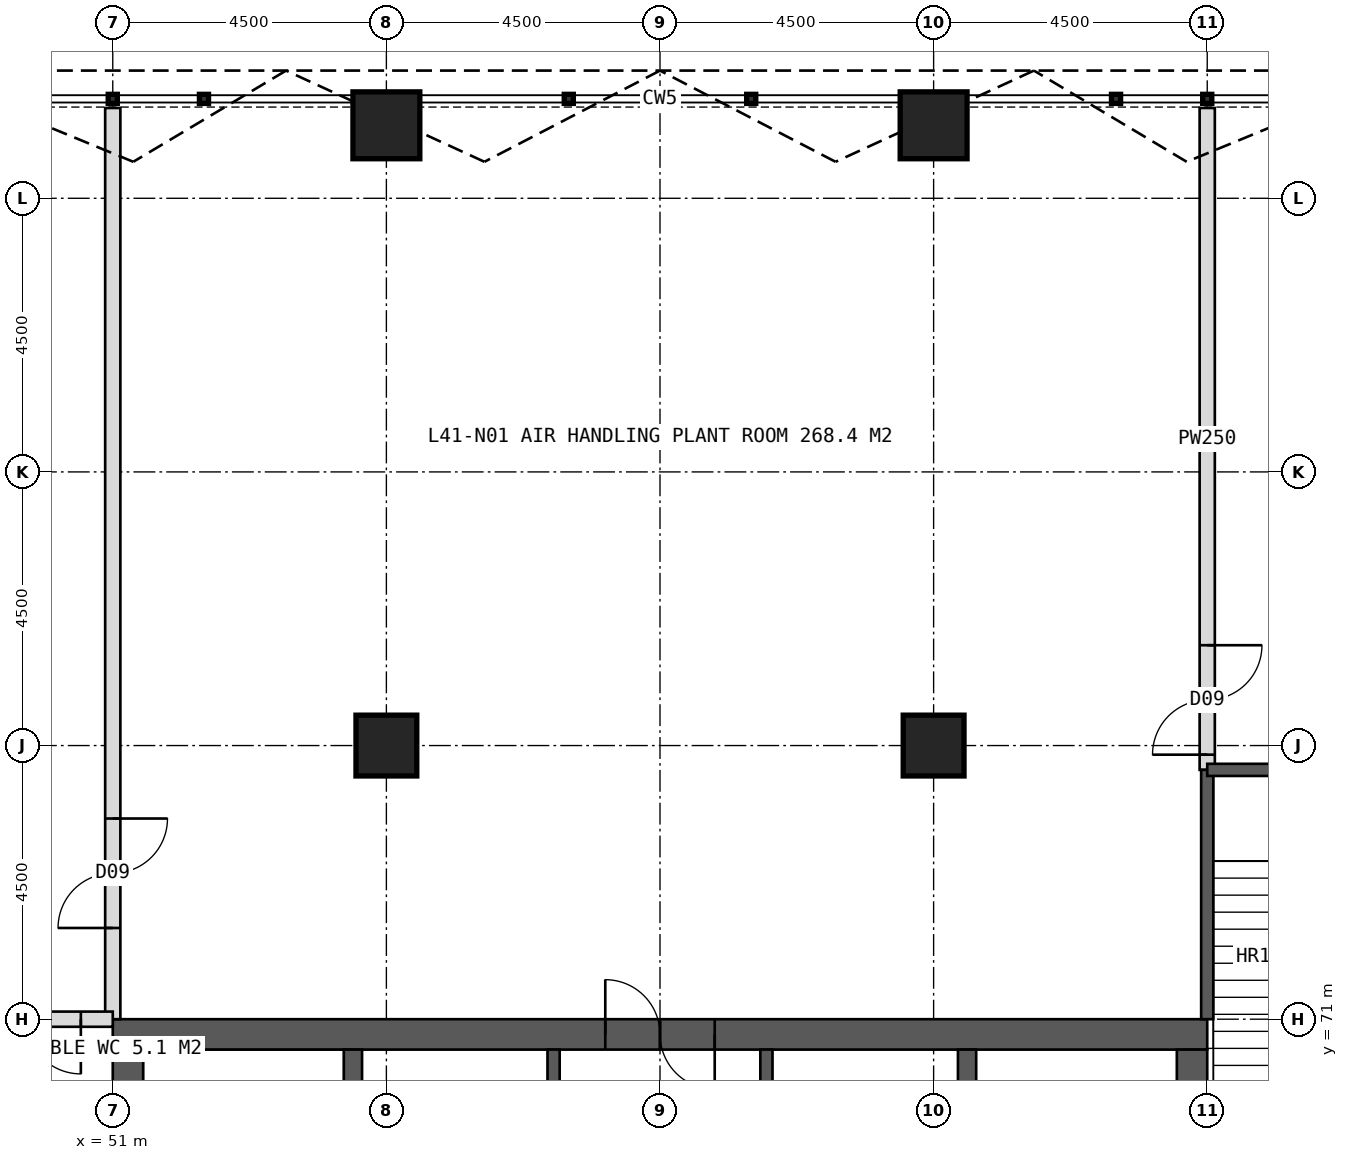
"""IFC4 building model, lengths in metres.
Left out: names, types, materials, properties, quantities, classifications, styles, units other than length and angle.
Written with IfcOpenShell. Run it as: python <this file> out.ifc"""

import sys

from ifc_helpers import new_model, si_unit, direction, frame, frame_2d, origin, origin_2d, place, context, subcontext, project, spatial, rectangle, hollow_rectangle, extrude, element, fill, save


model = new_model("IFC4")
c1 = context("Model", 3, precision=1e-05, world=origin(), true_north=direction((0.0, 1.0)))
c2 = subcontext(c1, "Body", "Model", "MODEL_VIEW")
j1 = project(units=[si_unit("LENGTHUNIT", "METRE"), si_unit("PLANEANGLEUNIT", "RADIAN")], contexts=[c1])
p1 = place(None, origin())
s1 = spatial("IfcSite", under=j1, at=p1, CompositionType="ELEMENT")
p2 = place(p1, origin())
s2 = spatial("IfcBuilding", under=s1, at=p2, CompositionType="ELEMENT")
p3 = place(p2, frame((0.0, 0.0, 172.0)))
s3 = spatial("IfcBuildingStorey", under=s2, at=p3, CompositionType="ELEMENT", Elevation=172.0)
p4 = place(p3, frame((51.0, 70.75, 0.0), z_axis=(0.0, 0.0, 1.0), x_axis=(1.0, 0.0, 0.0)))
e1 = element("IfcWall", 1, at=p4, inside=s3, PredefinedType="SHEAR", context=c2, shape_type="SweptSolid", body=[
    extrude(rectangle(XDim=18.0, YDim=0.5, at=frame_2d((9.0, 0.0))), origin(), (0.0, 0.0, 1.0), 5.0),
])
p5 = place(p4, frame((8.1, 0.0, 0.0)))
e2 = element("IfcOpeningElement", 2, at=p5, cuts=e1, PredefinedType="OPENING", context=c2, shape_type="SweptSolid", body=[
    extrude(rectangle(XDim=1.8, YDim=2.2, at=frame_2d((0.9, 1.1))), frame((0.0, 0.26, 0.0), z_axis=(0.0, -1.0, 0.0), x_axis=(1.0, 0.0, 0.0)), (0.0, 0.0, 1.0), 0.52),
])
p6 = place(p3, frame((51.25, 53.5, 0.0), z_axis=(0.0, 0.0, 1.0), x_axis=(0.0, 1.0, 0.0)))
e3 = element("IfcWall", 3, at=p6, inside=s3, PredefinedType="SHEAR", context=c2, shape_type="SweptSolid", body=[
    extrude(rectangle(XDim=17.0, YDim=0.5, at=frame_2d((8.5, 0.0))), origin(), (0.0, 0.0, 1.0), 5.0),
])
p7 = place(p6, frame((6.0, 0.0, 0.0)))
e4 = element("IfcOpeningElement", 4, at=p7, cuts=e3, PredefinedType="OPENING", context=c2, shape_type="SweptSolid", body=[
    extrude(rectangle(XDim=1.5, YDim=2.2, at=frame_2d((0.75, 1.1))), frame((0.0, 0.26, 0.0), z_axis=(0.0, -1.0, 0.0), x_axis=(1.0, 0.0, 0.0)), (0.0, 0.0, 1.0), 0.52),
])
p8 = place(p3, frame((68.75, 53.5, 0.0), z_axis=(0.0, 0.0, 1.0), x_axis=(0.0, 1.0, 0.0)))
e5 = element("IfcWall", 5, at=p8, inside=s3, PredefinedType="SHEAR", context=c2, shape_type="SweptSolid", body=[
    extrude(rectangle(XDim=17.0, YDim=0.5, at=frame_2d((8.5, 0.0))), origin(), (0.0, 0.0, 1.0), 5.0),
])
p9 = place(p8, frame((9.5, 0.0, 0.0)))
e6 = element("IfcOpeningElement", 6, at=p9, cuts=e5, PredefinedType="OPENING", context=c2, shape_type="SweptSolid", body=[
    extrude(rectangle(XDim=1.5, YDim=2.2, at=frame_2d((0.75, 1.1))), frame((0.0, 0.26, 0.0), z_axis=(0.0, -1.0, 0.0), x_axis=(1.0, 0.0, 0.0)), (0.0, 0.0, 1.0), 0.52),
])
for number, where, z_axis, x_axis in (
    (7, (54.95, 53.5, 0.0), (0.0, 0.0, 1.0), (0.0, 1.0, 0.0)),
    (8, (65.05, 53.5, 0.0), (0.0, 0.0, 1.0), (0.0, 1.0, 0.0)),
):
    element("IfcWall", number, at=place(p3, frame(where, z_axis=z_axis, x_axis=x_axis)), inside=s3, PredefinedType="SHEAR", context=c2, shape_type="SweptSolid", body=[
        extrude(rectangle(XDim=17.0, YDim=0.3, at=frame_2d((8.5, 0.0))), origin(), (0.0, 0.0, 1.0), 5.0),
    ])
for number, where, z_axis, x_axis in (
    (9, (58.25, 53.5, 0.0), (0.0, 0.0, 1.0), (0.0, 1.0, 0.0)),
    (10, (61.75, 53.5, 0.0), (0.0, 0.0, 1.0), (0.0, 1.0, 0.0)),
):
    element("IfcWall", number, at=place(p3, frame(where, z_axis=z_axis, x_axis=x_axis)), inside=s3, PredefinedType="SHEAR", context=c2, shape_type="SweptSolid", body=[
        extrude(rectangle(XDim=17.0, YDim=0.2, at=frame_2d((8.5, 0.0))), origin(), (0.0, 0.0, 1.0), 5.0),
    ])
for number, where, z_axis, x_axis in (
    (11, (55.5, 75.5, 0.0), (0.0, 0.0, 1.0), (1.0, 0.0, 0.0)),
    (12, (64.5, 75.5, 0.0), (0.0, 0.0, 1.0), (1.0, 0.0, 0.0)),
):
    element("IfcColumn", number, at=place(p3, frame(where, z_axis=z_axis, x_axis=x_axis)), inside=s3, PredefinedType="COLUMN", context=c2, shape_type="SweptSolid", body=[
        extrude(hollow_rectangle(XDim=1.0, YDim=1.0, WallThickness=0.1, at=origin_2d()), origin(), (0.0, 0.0, 1.0), 5.0),
    ])
for number, where, z_axis, x_axis in (
    (13, (55.5, 85.7, 0.0), (0.0, 0.0, 1.0), (1.0, 0.0, 0.0)),
    (14, (64.5, 85.7, 0.0), (0.0, 0.0, 1.0), (1.0, 0.0, 0.0)),
):
    element("IfcColumn", number, at=place(p3, frame(where, z_axis=z_axis, x_axis=x_axis)), inside=s3, PredefinedType="COLUMN", context=c2, shape_type="SweptSolid", body=[
        extrude(hollow_rectangle(XDim=1.1, YDim=1.1, WallThickness=0.1, at=origin_2d()), origin(), (0.0, 0.0, 1.0), 5.0),
    ])
p10 = place(p3, frame((69.0, 75.1, 0.0), z_axis=(0.0, 0.0, 1.0), x_axis=(0.0, 1.0, 0.0)))
e15 = element("IfcWall", 15, at=p10, inside=s3, PredefinedType="SOLIDWALL", context=c2, shape_type="SweptSolid", body=[
    extrude(rectangle(XDim=10.885, YDim=0.25, at=frame_2d((5.442, 0.0))), origin(), (0.0, 0.0, 1.0), 4.75),
])
p11 = place(p10, frame((0.25, 0.0, 0.0)))
e16 = element("IfcOpeningElement", 16, at=p11, cuts=e15, PredefinedType="OPENING", context=c2, shape_type="SweptSolid", body=[
    extrude(rectangle(XDim=1.8, YDim=2.2, at=frame_2d((0.9, 1.1))), frame((0.0, 0.135, 0.0), z_axis=(0.0, -1.0, 0.0), x_axis=(1.0, 0.0, 0.0)), (0.0, 0.0, 1.0), 0.27),
])
p12 = place(p3, frame((51.0, 71.0, 0.0), z_axis=(0.0, 0.0, 1.0), x_axis=(0.0, 1.0, 0.0)))
e17 = element("IfcWall", 17, at=p12, inside=s3, PredefinedType="SOLIDWALL", context=c2, shape_type="SweptSolid", body=[
    extrude(rectangle(XDim=14.985, YDim=0.25, at=frame_2d((7.493, 0.0))), origin(), (0.0, 0.0, 1.0), 4.75),
])
p13 = place(p12, frame((1.5, 0.0, 0.0)))
e18 = element("IfcOpeningElement", 18, at=p13, cuts=e17, PredefinedType="OPENING", context=c2, shape_type="SweptSolid", body=[
    extrude(rectangle(XDim=1.8, YDim=2.2, at=frame_2d((0.9, 1.1))), frame((0.0, 0.135, 0.0), z_axis=(0.0, -1.0, 0.0), x_axis=(1.0, 0.0, 0.0)), (0.0, 0.0, 1.0), 0.27),
])
p14 = place(p3, frame((51.0, 71.0, 0.0), z_axis=(0.0, 0.0, 1.0), x_axis=(-1.0, 0.0, 0.0)))
e19 = element("IfcWall", 19, at=p14, inside=s3, PredefinedType="SOLIDWALL", context=c2, shape_type="SweptSolid", body=[
    extrude(rectangle(XDim=14.985, YDim=0.25, at=frame_2d((7.493, 0.0))), origin(), (0.0, 0.0, 1.0), 4.75),
])
p15 = place(p14, frame((0.525, 0.0, 0.0)))
e20 = element("IfcOpeningElement", 20, at=p15, cuts=e19, PredefinedType="OPENING", context=c2, shape_type="SweptSolid", body=[
    extrude(rectangle(XDim=1.8, YDim=2.2, at=frame_2d((0.9, 1.1))), frame((0.0, 0.135, 0.0), z_axis=(0.0, -1.0, 0.0), x_axis=(1.0, 0.0, 0.0)), (0.0, 0.0, 1.0), 0.27),
])
p16 = place(p3, frame((69.0, 71.0, 0.0), z_axis=(0.0, 0.0, 1.0), x_axis=(0.0, 1.0, 0.0)))
e21 = element("IfcWall", 21, at=p16, inside=s3, PredefinedType="SOLIDWALL", context=c2, shape_type="SweptSolid", body=[
    extrude(rectangle(XDim=4.1, YDim=0.2, at=frame_2d((2.05, 0.0))), origin(), (0.0, 0.0, 1.0), 4.75),
])
p17 = place(p3, frame((69.0, 75.1, 0.0), z_axis=(0.0, 0.0, 1.0), x_axis=(1.0, 0.0, 0.0)))
e22 = element("IfcWall", 22, at=p17, inside=s3, PredefinedType="SOLIDWALL", context=c2, shape_type="SweptSolid", body=[
    extrude(rectangle(XDim=3.5, YDim=0.2, at=frame_2d((1.75, 0.0))), origin(), (0.0, 0.0, 1.0), 4.75),
])
p18 = place(p17, frame((1.15, 0.0, 0.0)))
e23 = element("IfcOpeningElement", 23, at=p18, cuts=e22, PredefinedType="OPENING", context=c2, shape_type="SweptSolid", body=[
    extrude(rectangle(XDim=1.2, YDim=2.1, at=frame_2d((0.6, 1.05))), frame((0.0, 0.11, 0.0), z_axis=(0.0, -1.0, 0.0), x_axis=(1.0, 0.0, 0.0)), (0.0, 0.0, 1.0), 0.22),
])
p19 = place(p11, origin())
e24 = element("IfcDoor", 24, at=p19, inside=s3, OperationType="DOUBLE_DOOR_SINGLE_SWING", PredefinedType="DOOR", context=c2, shape_type="SweptSolid", body=[
    extrude(rectangle(XDim=1.8, YDim=2.2, at=frame_2d((0.9, 1.1))), frame((0.0, 0.025, 0.0), z_axis=(0.0, -1.0, 0.0), x_axis=(1.0, 0.0, 0.0)), (0.0, 0.0, 1.0), 0.05),
])
fill(e16, e24)
p20 = place(p13, origin())
e25 = element("IfcDoor", 25, at=p20, inside=s3, OperationType="DOUBLE_DOOR_SINGLE_SWING", PredefinedType="DOOR", context=c2, shape_type="SweptSolid", body=[
    extrude(rectangle(XDim=1.8, YDim=2.2, at=frame_2d((0.9, 1.1))), frame((0.0, 0.025, 0.0), z_axis=(0.0, -1.0, 0.0), x_axis=(1.0, 0.0, 0.0)), (0.0, 0.0, 1.0), 0.05),
])
fill(e18, e25)
p21 = place(p15, origin())
e26 = element("IfcDoor", 26, at=p21, inside=s3, OperationType="DOUBLE_DOOR_SINGLE_SWING", PredefinedType="DOOR", context=c2, shape_type="SweptSolid", body=[
    extrude(rectangle(XDim=1.8, YDim=2.2, at=frame_2d((0.9, 1.1))), frame((0.0, 0.025, 0.0), z_axis=(0.0, -1.0, 0.0), x_axis=(1.0, 0.0, 0.0)), (0.0, 0.0, 1.0), 0.05),
])
fill(e20, e26)
p22 = place(p5, origin())
e27 = element("IfcDoor", 27, at=p22, inside=s3, OperationType="DOUBLE_DOOR_SINGLE_SWING", PredefinedType="DOOR", context=c2, shape_type="SweptSolid", body=[
    extrude(rectangle(XDim=1.8, YDim=2.2, at=frame_2d((0.9, 1.1))), frame((0.0, 0.025, 0.0), z_axis=(0.0, -1.0, 0.0), x_axis=(1.0, 0.0, 0.0)), (0.0, 0.0, 1.0), 0.05),
])
fill(e2, e27)
save(model, sys.argv[1])
